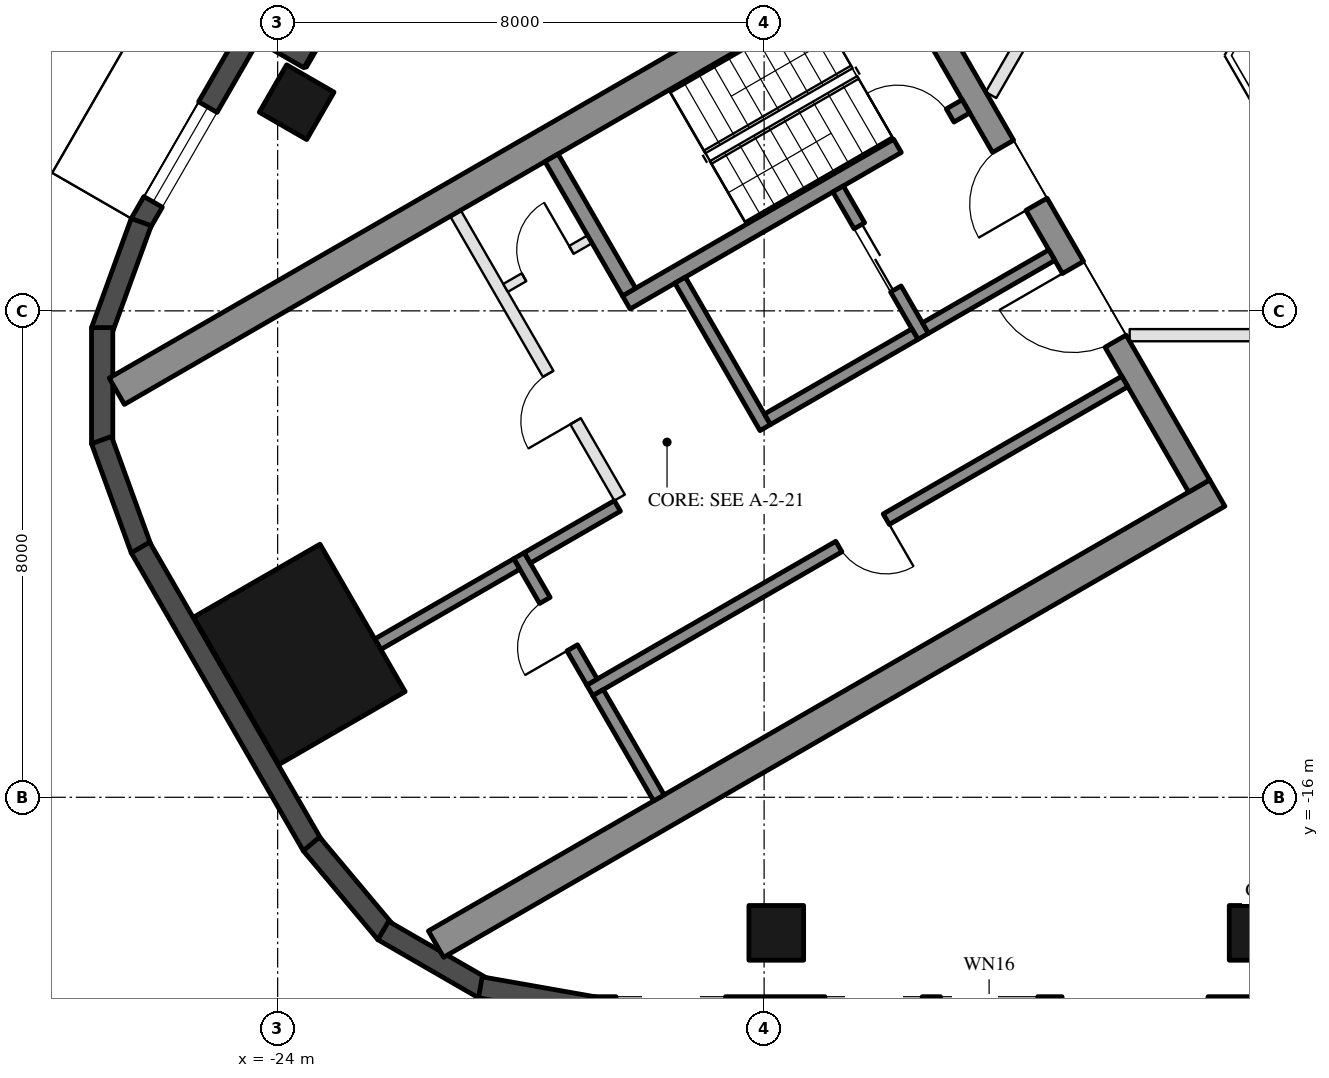
"""IFC4 building model, lengths in metres.
Left out: names, types, materials, properties, quantities, classifications, styles, units other than length and angle.
Written with IfcOpenShell. Run it as: python <this file> out.ifc"""

import sys

from ifc_helpers import new_model, si_unit, direction, frame, frame_2d, origin, origin_2d, place, context, subcontext, project, spatial, rectangle, hollow_rectangle, extrude, element, fill, save


model = new_model("IFC4")
c1 = context("Model", 3, precision=1e-05, world=origin(), true_north=direction((0.0, 1.0)))
c2 = subcontext(c1, "Body", "Model", "MODEL_VIEW")
j1 = project(units=[si_unit("LENGTHUNIT", "METRE"), si_unit("PLANEANGLEUNIT", "RADIAN")], contexts=[c1])
p1 = place(None, origin())
s1 = spatial("IfcSite", under=j1, at=p1, CompositionType="ELEMENT")
p2 = place(p1, origin())
s2 = spatial("IfcBuilding", under=s1, at=p2, CompositionType="ELEMENT")
p3 = place(p2, frame((0.0, 0.0, 98.3)))
s3 = spatial("IfcBuildingStorey", under=s2, at=p3, CompositionType="ELEMENT", Elevation=98.3)
for number, where, z_axis, x_axis in (
    (1, (-15.8, -18.23, 0.0), (0.0, 0.0, 1.0), (-1.0, 0.0, 0.0)),
    (2, (-7.9, -18.23, 0.0), (0.0, 0.0, 1.0), (-1.0, 0.0, 0.0)),
    (3, (-23.688, -4.568, 0.0), (0.0, 0.0, 1.0), (0.5, 0.866, 0.0)),
):
    element("IfcColumn", number, at=place(p3, frame(where, z_axis=z_axis, x_axis=x_axis)), inside=s3, PredefinedType="COLUMN", context=c2, shape_type="SweptSolid", body=[
        extrude(hollow_rectangle(XDim=0.9, YDim=0.9, WallThickness=0.04, at=origin_2d()), origin(), (0.0, 0.0, 1.0), 3.7),
    ])
p4 = place(p3, frame((-23.643, -13.65, 0.0), z_axis=(0.0, 0.0, 1.0), x_axis=(-0.5, 0.866025403784, 0.0)))
e4 = element("IfcColumn", 4, at=p4, inside=s3, PredefinedType="COLUMN", context=c2, shape_type="SweptSolid", body=[
    extrude(hollow_rectangle(XDim=2.8, YDim=2.4, WallThickness=0.07, at=origin_2d()), origin(), (0.0, 0.0, 1.0), 3.7),
])
p5 = place(p3, frame((-20.309, 1.934, 0.0), z_axis=(0.0, 0.0, 1.0), x_axis=(-0.499992114976, -0.866029956157, 0.0)))
e5 = element("IfcWall", 5, at=p5, inside=s3, PredefinedType="SOLIDWALL", context=c2, shape_type="SweptSolid", body=[
    extrude(rectangle(XDim=6.74, YDim=0.35, at=frame_2d((3.37, 0.0))), origin(), (0.0, 0.0, 1.0), 3.55),
])
p6 = place(p5, frame((4.02, 0.0, 0.0)))
e6 = element("IfcOpeningElement", 6, at=p6, cuts=e5, PredefinedType="OPENING", context=c2, shape_type="SweptSolid", body=[
    extrude(rectangle(XDim=2.4, YDim=2.4, at=frame_2d((1.2, 1.2))), frame((0.0, 0.185, 0.0), z_axis=(0.0, -1.0, 0.0), x_axis=(1.0, 0.0, 0.0)), (0.0, 0.0, 1.0), 0.37),
])
p7 = place(p5, frame((0.77, 0.0, 0.3)))
e7 = element("IfcOpeningElement", 7, at=p7, cuts=e5, PredefinedType="OPENING", context=c2, shape_type="SweptSolid", body=[
    extrude(rectangle(XDim=2.9, YDim=2.65, at=frame_2d((1.45, 1.325))), frame((0.0, 0.185, 0.0), z_axis=(0.0, -1.0, 0.0), x_axis=(1.0, 0.0, 0.0)), (0.0, 0.0, 1.0), 0.37),
])
p8 = place(p3, frame((-23.481, -3.85, 0.0), z_axis=(0.0, 0.0, 1.0), x_axis=(-0.866092288191, 0.499884134912, 0.0)))
e8 = element("IfcWall", 8, at=p8, inside=s3, PredefinedType="SOLIDWALL", context=c2, shape_type="SweptSolid", body=[
    extrude(rectangle(XDim=1.22, YDim=0.35, at=frame_2d((0.61, 0.0))), origin(), (0.0, 0.0, 1.0), 3.55),
])
p9 = place(p3, frame((-24.299, -3.176, 0.0), z_axis=(0.0, 0.0, 1.0), x_axis=(-0.500028278809, -0.866009076391, 0.0)))
e9 = element("IfcWall", 9, at=p9, inside=s3, PredefinedType="SOLIDWALL", context=c2, shape_type="SweptSolid", body=[
    extrude(rectangle(XDim=3.916, YDim=0.35, at=frame_2d((1.958, 0.0))), origin(), (0.0, 0.0, 1.0), 3.55),
])
p10 = place(p9, frame((1.7, 0.0, 0.3)))
e10 = element("IfcOpeningElement", 10, at=p10, cuts=e9, PredefinedType="OPENING", context=c2, shape_type="SweptSolid", body=[
    extrude(rectangle(XDim=1.8, YDim=2.65, at=frame_2d((0.9, 1.325))), frame((0.0, 0.185, 0.0), z_axis=(0.0, -1.0, 0.0), x_axis=(1.0, 0.0, 0.0)), (0.0, 0.0, 1.0), 0.37),
])
for number, where, z_axis, x_axis in (
    (11, (-26.244, -6.54, 0.0), (0.0, 0.0, 1.0), (-0.342, -0.94, 0.0)),
    (12, (-26.886, -8.275, 0.0), (0.0, 0.0, 1.0), (0.0, -1.0, 0.0)),
    (13, (-26.897, -10.125, 0.0), (0.0, 0.0, 1.0), (0.342, -0.94, 0.0)),
):
    element("IfcWall", number, at=place(p3, frame(where, z_axis=z_axis, x_axis=x_axis)), inside=s3, PredefinedType="SOLIDWALL", context=c2, shape_type="SweptSolid", body=[
        extrude(rectangle(XDim=1.91, YDim=0.35, at=frame_2d((0.955, 0.0))), origin(), (0.0, 0.0, 1.0), 3.55),
    ])
p11 = place(p3, frame((-26.257, -11.893, 0.0), z_axis=(0.0, 0.0, 1.0), x_axis=(0.500018773155, -0.866014564827, 0.0)))
e14 = element("IfcWall", 14, at=p11, inside=s3, PredefinedType="SOLIDWALL", context=c2, shape_type="SweptSolid", body=[
    extrude(rectangle(XDim=5.658, YDim=0.35, at=frame_2d((2.829, 0.0))), origin(), (0.0, 0.0, 1.0), 3.55),
])
for number, where, z_axis, x_axis in (
    (15, (-23.445, -16.768, 0.0), (0.0, 0.0, 1.0), (0.643, -0.766, 0.0)),
    (16, (-22.264, -18.192, 0.0), (0.0, 0.0, 1.0), (0.866, -0.5, 0.0)),
):
    element("IfcWall", number, at=place(p3, frame(where, z_axis=z_axis, x_axis=x_axis)), inside=s3, PredefinedType="SOLIDWALL", context=c2, shape_type="SweptSolid", body=[
        extrude(rectangle(XDim=1.91, YDim=0.35, at=frame_2d((0.955, 0.0))), origin(), (0.0, 0.0, 1.0), 3.55),
    ])
p12 = place(p3, frame((-20.667, -19.126, 0.0), z_axis=(0.0, 0.0, 1.0), x_axis=(0.984798995425, -0.173697837091, 0.0)))
e17 = element("IfcWall", 17, at=p12, inside=s3, PredefinedType="SOLIDWALL", context=c2, shape_type="SweptSolid", body=[
    extrude(rectangle(XDim=1.91, YDim=0.35, at=frame_2d((0.955, 0.0))), origin(), (0.0, 0.0, 1.0), 3.55),
])
p13 = place(p3, frame((-18.816, -19.455, 0.0), z_axis=(0.0, 0.0, 1.0), x_axis=(1.0, 0.0, 0.0)))
e18 = element("IfcWall", 18, at=p13, inside=s3, PredefinedType="SOLIDWALL", context=c2, shape_type="SweptSolid", body=[
    extrude(rectangle(XDim=11.816, YDim=0.35, at=frame_2d((5.908, 0.0))), origin(), (0.0, 0.0, 1.0), 3.55),
])
p14 = place(p13, frame((0.381, 0.0, 0.3)))
e19 = element("IfcOpeningElement", 19, at=p14, cuts=e18, PredefinedType="OPENING", context=c2, shape_type="SweptSolid", body=[
    extrude(rectangle(XDim=1.8, YDim=2.65, at=frame_2d((0.9, 1.325))), frame((0.0, 0.185, 0.0), z_axis=(0.0, -1.0, 0.0), x_axis=(1.0, 0.0, 0.0)), (0.0, 0.0, 1.0), 0.37),
])
p15 = place(p13, frame((7.716, 0.0, 0.0)))
e20 = element("IfcOpeningElement", 20, at=p15, cuts=e18, PredefinedType="OPENING", context=c2, shape_type="SweptSolid", body=[
    extrude(rectangle(XDim=2.4, YDim=2.4, at=frame_2d((1.2, 1.2))), frame((0.0, 0.185, 0.0), z_axis=(0.0, -1.0, 0.0), x_axis=(1.0, 0.0, 0.0)), (0.0, 0.0, 1.0), 0.37),
])
p16 = place(p13, frame((3.816, 0.0, 0.3)))
e21 = element("IfcOpeningElement", 21, at=p16, cuts=e18, PredefinedType="OPENING", context=c2, shape_type="SweptSolid", body=[
    extrude(rectangle(XDim=1.6, YDim=2.65, at=frame_2d((0.8, 1.325))), frame((0.0, 0.185, 0.0), z_axis=(0.0, -1.0, 0.0), x_axis=(1.0, 0.0, 0.0)), (0.0, 0.0, 1.0), 0.37),
])
p17 = place(p13, frame((5.716, 0.0, 0.3)))
e22 = element("IfcOpeningElement", 22, at=p17, cuts=e18, PredefinedType="OPENING", context=c2, shape_type="SweptSolid", body=[
    extrude(rectangle(XDim=1.6, YDim=2.65, at=frame_2d((0.8, 1.325))), frame((0.0, 0.185, 0.0), z_axis=(0.0, -1.0, 0.0), x_axis=(1.0, 0.0, 0.0)), (0.0, 0.0, 1.0), 0.37),
])
for number, where, z_axis, x_axis in (
    (23, (-13.797, -1.903, 0.0), (0.0, 0.0, 1.0), (-0.866, -0.5, 0.0)),
    (24, (-8.547, -10.997, 0.0), (0.0, 0.0, 1.0), (-0.866, -0.5, 0.0)),
):
    element("IfcWall", number, at=place(p3, frame(where, z_axis=z_axis, x_axis=x_axis)), inside=s3, PredefinedType="SHEAR", context=c2, shape_type="SweptSolid", body=[
        extrude(rectangle(XDim=14.837, YDim=0.5, at=frame_2d((7.418, 0.0))), origin(), (0.0, 0.0, 1.0), 3.5),
    ])
p18 = place(p3, frame((-13.845, -2.22, 0.0), z_axis=(0.0, 0.0, 1.0), x_axis=(0.500004234368, -0.866022959057, 0.0)))
e25 = element("IfcWall", 25, at=p18, inside=s3, PredefinedType="SHEAR", context=c2, shape_type="SweptSolid", body=[
    extrude(rectangle(XDim=10.0, YDim=0.4, at=frame_2d((5.0, 0.0))), origin(), (0.0, 0.0, 1.0), 3.5),
])
p19 = place(p18, frame((3.55, 0.0, 0.0)))
e26 = element("IfcOpeningElement", 26, at=p19, cuts=e25, PredefinedType="OPENING", context=c2, shape_type="SweptSolid", body=[
    extrude(rectangle(XDim=1.1, YDim=2.1, at=frame_2d((0.55, 1.05))), frame((0.0, 0.21, 0.0), z_axis=(0.0, -1.0, 0.0), x_axis=(1.0, 0.0, 0.0)), (0.0, 0.0, 1.0), 0.42),
])
p20 = place(p18, frame((5.85, 0.0, 0.0)))
e27 = element("IfcOpeningElement", 27, at=p20, cuts=e25, PredefinedType="OPENING", context=c2, shape_type="SweptSolid", body=[
    extrude(rectangle(XDim=1.4, YDim=2.1, at=frame_2d((0.7, 1.05))), frame((0.0, 0.21, 0.0), z_axis=(0.0, -1.0, 0.0), x_axis=(1.0, 0.0, 0.0)), (0.0, 0.0, 1.0), 0.42),
])
p21 = place(p3, frame((-12.681, -4.636, 0.0), z_axis=(0.0, 0.0, 1.0), x_axis=(-0.866021702275, -0.500006411147, 0.0)))
e28 = element("IfcWall", 28, at=p21, inside=s3, PredefinedType="SHEAR", context=c2, shape_type="SweptSolid", body=[
    extrude(rectangle(XDim=6.45, YDim=0.25, at=frame_2d((3.225, 0.0))), origin(), (0.0, 0.0, 1.0), 3.5),
])
p22 = place(p21, frame((0.3, 0.0, 0.0)))
e29 = element("IfcOpeningElement", 29, at=p22, cuts=e28, PredefinedType="OPENING", context=c2, shape_type="SweptSolid", body=[
    extrude(rectangle(XDim=1.0, YDim=2.1, at=frame_2d((0.5, 1.05))), frame((0.0, 0.135, 0.0), z_axis=(0.0, -1.0, 0.0), x_axis=(1.0, 0.0, 0.0)), (0.0, 0.0, 1.0), 0.27),
])
p23 = place(p3, frame((-19.496, -5.482, 0.0), z_axis=(0.0, 0.0, 1.0), x_axis=(0.499990435942, -0.866030925526, 0.0)))
e30 = element("IfcWall", 30, at=p23, inside=s3, PredefinedType="SHEAR", context=c2, shape_type="SweptSolid", body=[
    extrude(rectangle(XDim=2.55, YDim=0.25, at=frame_2d((1.275, 0.0))), origin(), (0.0, 0.0, 1.0), 3.5),
])
p24 = place(p3, frame((-17.381, -7.495, 0.0), z_axis=(0.0, 0.0, 1.0), x_axis=(0.500011755427, -0.866018616679, 0.0)))
e31 = element("IfcWall", 31, at=p24, inside=s3, PredefinedType="SHEAR", context=c2, shape_type="SweptSolid", body=[
    extrude(rectangle(XDim=2.8, YDim=0.2, at=frame_2d((1.4, 0.0))), origin(), (0.0, 0.0, 1.0), 3.5),
])
p25 = place(p3, frame((-14.783, -5.995, 0.0), z_axis=(0.0, 0.0, 1.0), x_axis=(0.49994636267, -0.866056369097, 0.0)))
e32 = element("IfcWall", 32, at=p25, inside=s3, PredefinedType="SHEAR", context=c2, shape_type="SweptSolid", body=[
    extrude(rectangle(XDim=2.8, YDim=0.2, at=frame_2d((1.4, 0.0))), origin(), (0.0, 0.0, 1.0), 3.5),
])
p26 = place(p25, frame((0.7, 0.0, 0.0)))
e33 = element("IfcOpeningElement", 33, at=p26, cuts=e32, PredefinedType="OPENING", context=c2, shape_type="SweptSolid", body=[
    extrude(rectangle(XDim=1.2, YDim=2.1, at=frame_2d((0.6, 1.05))), frame((0.0, 0.11, 0.0), z_axis=(0.0, -1.0, 0.0), x_axis=(1.0, 0.0, 0.0)), (0.0, 0.0, 1.0), 0.22),
])
p27 = place(p3, frame((-13.52, -8.383, 0.0), z_axis=(0.0, 0.0, 1.0), x_axis=(-0.866034573852, -0.49998411664, 0.0)))
e34 = element("IfcWall", 34, at=p27, inside=s3, PredefinedType="SHEAR", context=c2, shape_type="SweptSolid", body=[
    extrude(rectangle(XDim=2.8, YDim=0.2, at=frame_2d((1.4, 0.0))), origin(), (0.0, 0.0, 1.0), 3.5),
])
p28 = place(p3, frame((-11.268, -7.083, 0.0), z_axis=(0.0, 0.0, 1.0), x_axis=(-0.866050077142, -0.499957262057, 0.0)))
e35 = element("IfcWall", 35, at=p28, inside=s3, PredefinedType="SHEAR", context=c2, shape_type="SweptSolid", body=[
    extrude(rectangle(XDim=2.4, YDim=0.2, at=frame_2d((1.2, 0.0))), origin(), (0.0, 0.0, 1.0), 3.5),
])
p29 = place(p3, frame((-10.068, -9.162, 0.0), z_axis=(0.0, 0.0, 1.0), x_axis=(-0.866032725843, -0.499987317609, 0.0)))
e36 = element("IfcWall", 36, at=p29, inside=s3, PredefinedType="SHEAR", context=c2, shape_type="SweptSolid", body=[
    extrude(rectangle(XDim=10.16, YDim=0.2, at=frame_2d((5.08, 0.0))), origin(), (0.0, 0.0, 1.0), 3.5),
])
p30 = place(p29, frame((4.53, 0.0, 0.0)))
e37 = element("IfcOpeningElement", 37, at=p30, cuts=e36, PredefinedType="OPENING", context=c2, shape_type="SweptSolid", body=[
    extrude(rectangle(XDim=0.9, YDim=2.1, at=frame_2d((0.45, 1.05))), frame((0.0, 0.11, 0.0), z_axis=(0.0, -1.0, 0.0), x_axis=(1.0, 0.0, 0.0)), (0.0, 0.0, 1.0), 0.22),
])
p31 = place(p3, frame((-20.031, -12.026, 0.0), z_axis=(0.0, 0.0, 1.0), x_axis=(0.500033551112, -0.866006032174, 0.0)))
e38 = element("IfcWall", 38, at=p31, inside=s3, PredefinedType="SHEAR", context=c2, shape_type="SweptSolid", body=[
    extrude(rectangle(XDim=2.4, YDim=0.2, at=frame_2d((1.2, 0.0))), origin(), (0.0, 0.0, 1.0), 3.5),
])
p32 = place(p31, frame((0.85, 0.0, 0.0)))
e39 = element("IfcOpeningElement", 39, at=p32, cuts=e38, PredefinedType="OPENING", context=c2, shape_type="SweptSolid", body=[
    extrude(rectangle(XDim=0.9, YDim=2.1, at=frame_2d((0.45, 1.05))), frame((0.0, 0.11, 0.0), z_axis=(0.0, -1.0, 0.0), x_axis=(1.0, 0.0, 0.0)), (0.0, 0.0, 1.0), 0.22),
])
p33 = place(p3, frame((-18.413, -11.208, 0.0), z_axis=(0.0, 0.0, 1.0), x_axis=(-0.866038183914, -0.499977863513, 0.0)))
e40 = element("IfcWall", 40, at=p33, inside=s3, PredefinedType="SHEAR", context=c2, shape_type="SweptSolid", body=[
    extrude(rectangle(XDim=1.71, YDim=0.2, at=frame_2d((0.855, 0.0))), origin(), (0.0, 0.0, 1.0), 3.5),
])
p34 = place(p3, frame((-18.73, -14.278, 0.0), z_axis=(0.0, 0.0, 1.0), x_axis=(0.50002537861, -0.866010750942, 0.0)))
e41 = element("IfcWall", 41, at=p34, inside=s3, PredefinedType="SHEAR", context=c2, shape_type="SweptSolid", body=[
    extrude(rectangle(XDim=2.0, YDim=0.2, at=frame_2d((1.0, 0.0))), origin(), (0.0, 0.0, 1.0), 3.5),
])
p35 = place(p3, frame((-20.067, -12.163, 0.0), z_axis=(0.0, 0.0, 1.0), x_axis=(-0.866060851709, -0.499938597367, 0.0)))
e42 = element("IfcWall", 42, at=p35, inside=s3, PredefinedType="SHEAR", context=c2, shape_type="SweptSolid", body=[
    extrude(rectangle(XDim=2.64, YDim=0.2, at=frame_2d((1.32, 0.0))), origin(), (0.0, 0.0, 1.0), 3.5),
])
p36 = place(p3, frame((-21.076, -6.395, 0.0), z_axis=(0.0, 0.0, 1.0), x_axis=(0.50001468107, -0.866016927499, 0.0)))
e43 = element("IfcWall", 43, at=p36, inside=s3, PredefinedType="PARTITIONING", context=c2, shape_type="SweptSolid", body=[
    extrude(rectangle(XDim=5.4, YDim=0.2, at=frame_2d((2.7, 0.0))), origin(), (0.0, 0.0, 1.0), 3.5),
])
p37 = place(p36, frame((3.05, 0.0, 0.0)))
e44 = element("IfcOpeningElement", 44, at=p37, cuts=e43, PredefinedType="OPENING", context=c2, shape_type="SweptSolid", body=[
    extrude(rectangle(XDim=0.9, YDim=2.1, at=frame_2d((0.45, 1.05))), frame((0.0, 0.11, 0.0), z_axis=(0.0, -1.0, 0.0), x_axis=(1.0, 0.0, 0.0)), (0.0, 0.0, 1.0), 0.22),
])
p38 = place(p3, frame((-18.866, -6.822, 0.0), z_axis=(0.0, 0.0, 1.0), x_axis=(-0.866028054938, -0.499995408039, 0.0)))
e45 = element("IfcWall", 45, at=p38, inside=s3, PredefinedType="PARTITIONING", context=c2, shape_type="SweptSolid", body=[
    extrude(rectangle(XDim=1.6, YDim=0.15, at=frame_2d((0.8, 0.0))), origin(), (0.0, 0.0, 1.0), 3.5),
])
p39 = place(p38, frame((0.35, 0.0, 0.0)))
e46 = element("IfcOpeningElement", 46, at=p39, cuts=e45, PredefinedType="OPENING", context=c2, shape_type="SweptSolid", body=[
    extrude(rectangle(XDim=0.9, YDim=2.1, at=frame_2d((0.45, 1.05))), frame((0.0, 0.085, 0.0), z_axis=(0.0, -1.0, 0.0), x_axis=(1.0, 0.0, 0.0)), (0.0, 0.0, 1.0), 0.17),
])
p40 = place(p3, frame((-3.703, -8.4, 0.0), z_axis=(0.0, 0.0, 1.0), x_axis=(-1.0, 0.0, 0.0)))
e47 = element("IfcWall", 47, at=p40, inside=s3, PredefinedType="PARTITIONING", context=c2, shape_type="SweptSolid", body=[
    extrude(rectangle(XDim=6.285, YDim=0.2, at=frame_2d((3.143, 0.0))), origin(), (0.0, 0.0, 1.0), 2.95),
])
p41 = place(p40, frame((2.642, 0.0, 0.0)))
e48 = element("IfcOpeningElement", 48, at=p41, cuts=e47, PredefinedType="OPENING", context=c2, shape_type="SweptSolid", body=[
    extrude(rectangle(XDim=1.0, YDim=2.1, at=frame_2d((0.5, 1.05))), frame((0.0, 0.11, 0.0), z_axis=(0.0, -1.0, 0.0), x_axis=(1.0, 0.0, 0.0)), (0.0, 0.0, 1.0), 0.22),
])
p42 = place(p3, frame((-12.269, -4.45, 0.0), z_axis=(0.0, 0.0, 1.0), x_axis=(0.500015331954, 0.866016551696, 0.0)))
e49 = element("IfcWall", 49, at=p42, inside=s3, PredefinedType="PARTITIONING", context=c2, shape_type="SweptSolid", body=[
    extrude(rectangle(XDim=4.979, YDim=0.2, at=frame_2d((2.489, 0.0))), origin(), (0.0, 0.0, 1.0), 2.95),
])
p43 = place(p42, frame((1.99, 0.0, 0.0)))
e50 = element("IfcOpeningElement", 50, at=p43, cuts=e49, PredefinedType="OPENING", context=c2, shape_type="SweptSolid", body=[
    extrude(rectangle(XDim=1.0, YDim=2.1, at=frame_2d((0.5, 1.05))), frame((0.0, 0.11, 0.0), z_axis=(0.0, -1.0, 0.0), x_axis=(1.0, 0.0, 0.0)), (0.0, 0.0, 1.0), 0.22),
])
p44 = place(p10, origin())
e51 = element("IfcWindow", 51, at=p44, inside=s3, PartitioningType="SINGLE_PANEL", PredefinedType="WINDOW", context=c2, shape_type="SweptSolid", body=[
    extrude(rectangle(XDim=1.8, YDim=2.65, at=frame_2d((0.9, 1.325))), frame((0.0, 0.03, 0.0), z_axis=(0.0, -1.0, 0.0), x_axis=(1.0, 0.0, 0.0)), (0.0, 0.0, 1.0), 0.06),
])
fill(e10, e51)
p45 = place(p26, origin())
e52 = element("IfcDoor", 52, at=p45, inside=s3, OperationType="DOUBLE_DOOR_SLIDING", PredefinedType="DOOR", context=c2, shape_type="SweptSolid", body=[
    extrude(rectangle(XDim=1.2, YDim=2.1, at=frame_2d((0.6, 1.05))), frame((0.0, 0.025, 0.0), z_axis=(0.0, -1.0, 0.0), x_axis=(1.0, 0.0, 0.0)), (0.0, 0.0, 1.0), 0.05),
])
fill(e33, e52)
p46 = place(p39, frame((0.9, 0.0, 0.0), z_axis=(0.0, 0.0, 1.0), x_axis=(-1.0, 0.0, 0.0)))
e53 = element("IfcDoor", 53, at=p46, inside=s3, OperationType="SINGLE_SWING_RIGHT", PredefinedType="DOOR", context=c2, shape_type="SweptSolid", body=[
    extrude(rectangle(XDim=0.9, YDim=2.1, at=frame_2d((0.45, 1.05))), frame((0.0, 0.025, 0.0), z_axis=(0.0, -1.0, 0.0), x_axis=(1.0, 0.0, 0.0)), (0.0, 0.0, 1.0), 0.05),
])
fill(e46, e53)
p47 = place(p30, origin())
e54 = element("IfcDoor", 54, at=p47, inside=s3, OperationType="SINGLE_SWING_LEFT", PredefinedType="DOOR", context=c2, shape_type="SweptSolid", body=[
    extrude(rectangle(XDim=0.9, YDim=2.1, at=frame_2d((0.45, 1.05))), frame((0.0, 0.025, 0.0), z_axis=(0.0, -1.0, 0.0), x_axis=(1.0, 0.0, 0.0)), (0.0, 0.0, 1.0), 0.05),
])
fill(e37, e54)
p48 = place(p32, frame((0.9, 0.0, 0.0), z_axis=(0.0, 0.0, 1.0), x_axis=(-1.0, 0.0, 0.0)))
e55 = element("IfcDoor", 55, at=p48, inside=s3, OperationType="SINGLE_SWING_LEFT", PredefinedType="DOOR", context=c2, shape_type="SweptSolid", body=[
    extrude(rectangle(XDim=0.9, YDim=2.1, at=frame_2d((0.45, 1.05))), frame((0.0, 0.025, 0.0), z_axis=(0.0, -1.0, 0.0), x_axis=(1.0, 0.0, 0.0)), (0.0, 0.0, 1.0), 0.05),
])
fill(e39, e55)
p49 = place(p37, frame((0.9, 0.0, 0.0), z_axis=(0.0, 0.0, 1.0), x_axis=(-1.0, 0.0, 0.0)))
e56 = element("IfcDoor", 56, at=p49, inside=s3, OperationType="SINGLE_SWING_LEFT", PredefinedType="DOOR", context=c2, shape_type="SweptSolid", body=[
    extrude(rectangle(XDim=0.9, YDim=2.1, at=frame_2d((0.45, 1.05))), frame((0.0, 0.025, 0.0), z_axis=(0.0, -1.0, 0.0), x_axis=(1.0, 0.0, 0.0)), (0.0, 0.0, 1.0), 0.05),
])
fill(e44, e56)
p50 = place(p19, frame((1.1, 0.0, 0.0), z_axis=(0.0, 0.0, 1.0), x_axis=(-1.0, 0.0, 0.0)))
e57 = element("IfcDoor", 57, at=p50, inside=s3, OperationType="SINGLE_SWING_LEFT", PredefinedType="DOOR", context=c2, shape_type="SweptSolid", body=[
    extrude(rectangle(XDim=1.1, YDim=2.1, at=frame_2d((0.55, 1.05))), frame((0.0, 0.025, 0.0), z_axis=(0.0, -1.0, 0.0), x_axis=(1.0, 0.0, 0.0)), (0.0, 0.0, 1.0), 0.05),
])
fill(e26, e57)
p51 = place(p20, frame((1.4, 0.0, 0.0), z_axis=(0.0, 0.0, 1.0), x_axis=(-1.0, 0.0, 0.0)))
e58 = element("IfcDoor", 58, at=p51, inside=s3, OperationType="DOUBLE_DOOR_SINGLE_SWING", PredefinedType="DOOR", context=c2, shape_type="SweptSolid", body=[
    extrude(rectangle(XDim=1.4, YDim=2.1, at=frame_2d((0.7, 1.05))), frame((0.0, 0.025, 0.0), z_axis=(0.0, -1.0, 0.0), x_axis=(1.0, 0.0, 0.0)), (0.0, 0.0, 1.0), 0.05),
])
fill(e27, e58)
p52 = place(p22, frame((1.0, 0.0, 0.0), z_axis=(0.0, 0.0, 1.0), x_axis=(-1.0, 0.0, 0.0)))
e59 = element("IfcDoor", 59, at=p52, inside=s3, OperationType="SINGLE_SWING_LEFT", PredefinedType="DOOR", context=c2, shape_type="SweptSolid", body=[
    extrude(rectangle(XDim=1.0, YDim=2.1, at=frame_2d((0.5, 1.05))), frame((0.0, 0.025, 0.0), z_axis=(0.0, -1.0, 0.0), x_axis=(1.0, 0.0, 0.0)), (0.0, 0.0, 1.0), 0.05),
])
fill(e29, e59)
save(model, sys.argv[1])
